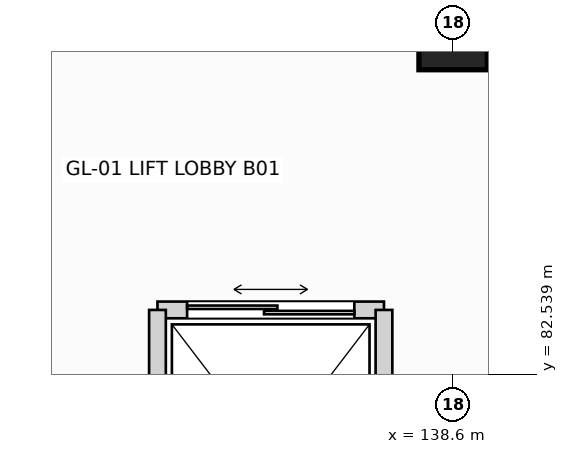
"""IFC4 building model, lengths in metres.
Left out: names, types, materials, properties, quantities, classifications, styles, units other than length and angle.
Written with IfcOpenShell. Run it as: python <this file> out.ifc"""

import sys

from ifc_helpers import new_model, si_unit, direction, frame, frame_2d, origin, origin_2d, place, context, subcontext, project, spatial, rectangle, extrude, element, fill, save


model = new_model("IFC4")
c1 = context("Model", 3, precision=1e-05, world=origin(), true_north=direction((0.0, 1.0)))
c2 = subcontext(c1, "Body", "Model", "MODEL_VIEW")
j1 = project(units=[si_unit("LENGTHUNIT", "METRE"), si_unit("PLANEANGLEUNIT", "RADIAN")], contexts=[c1])
p1 = place(None, origin())
s1 = spatial("IfcSite", under=j1, at=p1, CompositionType="ELEMENT")
p2 = place(p1, origin())
s2 = spatial("IfcBuilding", under=s1, at=p2, CompositionType="ELEMENT")
p3 = place(p2, frame((0.0, 0.0, -5.4)))
s3 = spatial("IfcBuildingStorey", under=s2, at=p3, CompositionType="ELEMENT", Elevation=-5.4)
p4 = place(p3, frame((138.6, 87.0, 0.0), z_axis=(0.0, 0.0, 1.0), x_axis=(1.0, 0.0, 0.0)))
e1 = element("IfcColumn", 1, at=p4, inside=s3, PredefinedType="COLUMN", context=c2, shape_type="SweptSolid", body=[
    extrude(rectangle(XDim=0.9, YDim=0.9, at=origin_2d()), origin(), (0.0, 0.0, 1.0), 5.4),
])
p5 = place(p3, frame((134.71, 83.39, 0.0), z_axis=(0.0, 0.0, 1.0), x_axis=(1.0, 0.0, 0.0)))
e2 = element("IfcWall", 2, at=p5, inside=s3, PredefinedType="PARTITIONING", context=c2, shape_type="SweptSolid", body=[
    extrude(rectangle(XDim=2.98, YDim=0.22, at=frame_2d((1.49, 0.0))), origin(), (0.0, 0.0, 1.0), 5.045),
])
p6 = place(p5, frame((0.39, 0.0, 0.0)))
e3 = element("IfcOpeningElement", 3, at=p6, cuts=e2, PredefinedType="OPENING", context=c2, shape_type="SweptSolid", body=[
    extrude(rectangle(XDim=2.2, YDim=2.5, at=frame_2d((1.1, 1.25))), frame((0.0, 0.12, 0.0), z_axis=(0.0, -1.0, 0.0), x_axis=(1.0, 0.0, 0.0)), (0.0, 0.0, 1.0), 0.24),
])
for number, where, z_axis, x_axis in (
    (4, (134.71, 79.61, 0.0), (0.0, 0.0, 1.0), (0.0, 1.0, 0.0)),
    (5, (137.69, 79.61, 0.0), (0.0, 0.0, 1.0), (0.0, 1.0, 0.0)),
):
    element("IfcWall", number, at=place(p3, frame(where, z_axis=z_axis, x_axis=x_axis)), inside=s3, PredefinedType="PARTITIONING", context=c2, shape_type="SweptSolid", body=[
        extrude(rectangle(XDim=3.78, YDim=0.22, at=frame_2d((1.89, 0.0))), origin(), (0.0, 0.0, 1.0), 5.045),
    ])
p7 = place(p6, origin())
e6 = element("IfcDoor", 6, at=p7, inside=s3, OperationType="DOUBLE_DOOR_SLIDING", PredefinedType="DOOR", context=c2, shape_type="SweptSolid", body=[
    extrude(rectangle(XDim=2.2, YDim=2.5, at=frame_2d((1.1, 1.25))), frame((0.0, 0.025, 0.0), z_axis=(0.0, -1.0, 0.0), x_axis=(1.0, 0.0, 0.0)), (0.0, 0.0, 1.0), 0.05),
])
fill(e3, e6)
save(model, sys.argv[1])
